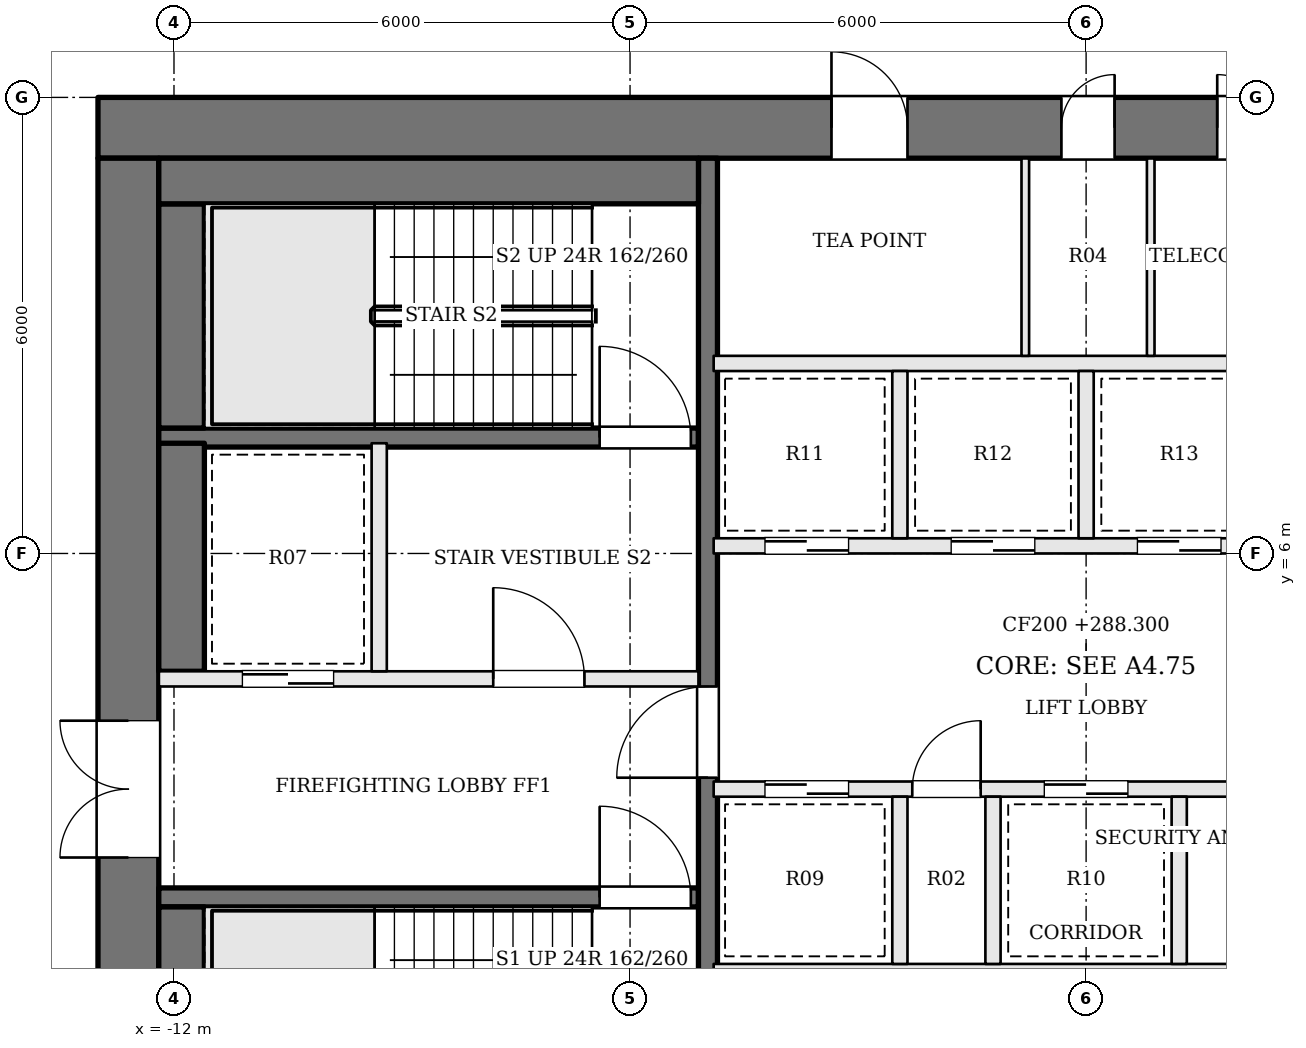
"""IFC4 building model, lengths in metres.
Left out: names, types, materials, properties, quantities, classifications, styles, units other than length and angle.
Written with IfcOpenShell. Run it as: python <this file> out.ifc"""

import sys

from ifc_helpers import new_model, si_unit, direction, frame, frame_2d, origin, place, context, subcontext, project, spatial, rectangle, extrude, element, fill, save


model = new_model("IFC4")
c1 = context("Model", 3, precision=1e-05, world=origin(), true_north=direction((0.0, 1.0)))
c2 = subcontext(c1, "Body", "Model", "MODEL_VIEW")
j1 = project(units=[si_unit("LENGTHUNIT", "METRE"), si_unit("PLANEANGLEUNIT", "RADIAN")], contexts=[c1])
p1 = place(None, origin())
s1 = spatial("IfcSite", under=j1, at=p1, CompositionType="ELEMENT")
p2 = place(p1, origin())
s2 = spatial("IfcBuilding", under=s1, at=p2, CompositionType="ELEMENT")
p3 = place(p2, frame((0.0, 0.0, 288.3)))
s3 = spatial("IfcBuildingStorey", under=s2, at=p3, CompositionType="ELEMENT", Elevation=288.3)
p4 = place(p3, frame((-13.0, 11.6, 0.0), z_axis=(0.0, 0.0, 1.0), x_axis=(1.0, 0.0, 0.0)))
e1 = element("IfcWall", 1, at=p4, inside=s3, PredefinedType="SHEAR", context=c2, shape_type="SweptSolid", body=[
    extrude(rectangle(XDim=26.0, YDim=0.8, at=frame_2d((13.0, 0.0))), origin(), (0.0, 0.0, 1.0), 3.9),
])
p5 = place(p4, frame((9.65, 0.0, 0.0)))
e2 = element("IfcOpeningElement", 2, at=p5, cuts=e1, PredefinedType="OPENING", context=c2, shape_type="SweptSolid", body=[
    extrude(rectangle(XDim=1.0, YDim=2.1, at=frame_2d((0.5, 1.05))), frame((0.0, 0.41, 0.0), z_axis=(0.0, -1.0, 0.0), x_axis=(1.0, 0.0, 0.0)), (0.0, 0.0, 1.0), 0.82),
])
p6 = place(p4, frame((12.675, 0.0, 0.0)))
e3 = element("IfcOpeningElement", 3, at=p6, cuts=e1, PredefinedType="OPENING", context=c2, shape_type="SweptSolid", body=[
    extrude(rectangle(XDim=0.7, YDim=2.1, at=frame_2d((0.35, 1.05))), frame((0.0, 0.41, 0.0), z_axis=(0.0, -1.0, 0.0), x_axis=(1.0, 0.0, 0.0)), (0.0, 0.0, 1.0), 0.82),
])
p7 = place(p4, frame((14.725, 0.0, 0.0)))
e4 = element("IfcOpeningElement", 4, at=p7, cuts=e1, PredefinedType="OPENING", context=c2, shape_type="SweptSolid", body=[
    extrude(rectangle(XDim=0.7, YDim=2.1, at=frame_2d((0.35, 1.05))), frame((0.0, 0.41, 0.0), z_axis=(0.0, -1.0, 0.0), x_axis=(1.0, 0.0, 0.0)), (0.0, 0.0, 1.0), 0.82),
])
p8 = place(p4, frame((16.6, 0.0, 0.0)))
e5 = element("IfcOpeningElement", 5, at=p8, cuts=e1, PredefinedType="OPENING", context=c2, shape_type="SweptSolid", body=[
    extrude(rectangle(XDim=1.0, YDim=2.1, at=frame_2d((0.5, 1.05))), frame((0.0, 0.41, 0.0), z_axis=(0.0, -1.0, 0.0), x_axis=(1.0, 0.0, 0.0)), (0.0, 0.0, 1.0), 0.82),
])
p9 = place(p3, frame((-12.6, -2.2, 0.0), z_axis=(0.0, 0.0, 1.0), x_axis=(0.0, 1.0, 0.0)))
e6 = element("IfcWall", 6, at=p9, inside=s3, PredefinedType="SHEAR", context=c2, shape_type="SweptSolid", body=[
    extrude(rectangle(XDim=13.4, YDim=0.8, at=frame_2d((6.7, 0.0))), origin(), (0.0, 0.0, 1.0), 3.9),
])
p10 = place(p9, frame((4.2, 0.0, 0.0)))
e7 = element("IfcOpeningElement", 7, at=p10, cuts=e6, PredefinedType="OPENING", context=c2, shape_type="SweptSolid", body=[
    extrude(rectangle(XDim=1.8, YDim=2.1, at=frame_2d((0.9, 1.05))), frame((0.0, 0.41, 0.0), z_axis=(0.0, -1.0, 0.0), x_axis=(1.0, 0.0, 0.0)), (0.0, 0.0, 1.0), 0.82),
])
p11 = place(p3, frame((-12.2, 1.475, 0.0), z_axis=(0.0, 0.0, 1.0), x_axis=(1.0, 0.0, 0.0)))
e8 = element("IfcWall", 8, at=p11, inside=s3, PredefinedType="SOLIDWALL", context=c2, shape_type="SweptSolid", body=[
    extrude(rectangle(XDim=7.1, YDim=0.25, at=frame_2d((3.55, 0.0))), origin(), (0.0, 0.0, 1.0), 3.7),
])
p12 = place(p11, frame((5.8, 0.0, 0.0)))
e9 = element("IfcOpeningElement", 9, at=p12, cuts=e8, PredefinedType="OPENING", context=c2, shape_type="SweptSolid", body=[
    extrude(rectangle(XDim=1.2, YDim=2.1, at=frame_2d((0.6, 1.05))), frame((0.0, 0.135, 0.0), z_axis=(0.0, -1.0, 0.0), x_axis=(1.0, 0.0, 0.0)), (0.0, 0.0, 1.0), 0.27),
])
p13 = place(p3, frame((-12.2, 4.35, 0.0), z_axis=(0.0, 0.0, 1.0), x_axis=(1.0, 0.0, 0.0)))
e10 = element("IfcWall", 10, at=p13, inside=s3, PredefinedType="SOLIDWALL", context=c2, shape_type="SweptSolid", body=[
    extrude(rectangle(XDim=7.1, YDim=0.2, at=frame_2d((3.55, 0.0))), origin(), (0.0, 0.0, 1.0), 3.7),
])
p14 = place(p13, frame((4.4, 0.0, 0.0)))
e11 = element("IfcOpeningElement", 11, at=p14, cuts=e10, PredefinedType="OPENING", context=c2, shape_type="SweptSolid", body=[
    extrude(rectangle(XDim=1.2, YDim=2.1, at=frame_2d((0.6, 1.05))), frame((0.0, 0.11, 0.0), z_axis=(0.0, -1.0, 0.0), x_axis=(1.0, 0.0, 0.0)), (0.0, 0.0, 1.0), 0.22),
])
p15 = place(p13, frame((1.1, 0.0, 0.0)))
e12 = element("IfcOpeningElement", 12, at=p15, cuts=e10, PredefinedType="OPENING", context=c2, shape_type="SweptSolid", body=[
    extrude(rectangle(XDim=1.2, YDim=2.1, at=frame_2d((0.6, 1.05))), frame((0.0, 0.11, 0.0), z_axis=(0.0, -1.0, 0.0), x_axis=(1.0, 0.0, 0.0)), (0.0, 0.0, 1.0), 0.22),
])
p16 = place(p3, frame((-12.2, 7.525, 0.0), z_axis=(0.0, 0.0, 1.0), x_axis=(1.0, 0.0, 0.0)))
e13 = element("IfcWall", 13, at=p16, inside=s3, PredefinedType="SOLIDWALL", context=c2, shape_type="SweptSolid", body=[
    extrude(rectangle(XDim=7.1, YDim=0.25, at=frame_2d((3.55, 0.0))), origin(), (0.0, 0.0, 1.0), 3.7),
])
p17 = place(p16, frame((5.8, 0.0, 0.0)))
e14 = element("IfcOpeningElement", 14, at=p17, cuts=e13, PredefinedType="OPENING", context=c2, shape_type="SweptSolid", body=[
    extrude(rectangle(XDim=1.2, YDim=2.1, at=frame_2d((0.6, 1.05))), frame((0.0, 0.135, 0.0), z_axis=(0.0, -1.0, 0.0), x_axis=(1.0, 0.0, 0.0)), (0.0, 0.0, 1.0), 0.27),
])
p18 = place(p3, frame((-9.3, 4.45, 0.0), z_axis=(0.0, 0.0, 1.0), x_axis=(0.0, 1.0, 0.0)))
e15 = element("IfcWall", 15, at=p18, inside=s3, PredefinedType="SOLIDWALL", context=c2, shape_type="SweptSolid", body=[
    extrude(rectangle(XDim=3.0, YDim=0.2, at=frame_2d((1.5, 0.0))), origin(), (0.0, 0.0, 1.0), 3.7),
])
p19 = place(p3, frame((-4.975, -2.2, 0.0), z_axis=(0.0, 0.0, 1.0), x_axis=(0.0, 1.0, 0.0)))
e16 = element("IfcWall", 16, at=p19, inside=s3, PredefinedType="SOLIDWALL", context=c2, shape_type="SweptSolid", body=[
    extrude(rectangle(XDim=13.4, YDim=0.25, at=frame_2d((6.7, 0.0))), origin(), (0.0, 0.0, 1.0), 3.7),
])
p20 = place(p19, frame((5.25, 0.0, 0.0)))
e17 = element("IfcOpeningElement", 17, at=p20, cuts=e16, PredefinedType="OPENING", context=c2, shape_type="SweptSolid", body=[
    extrude(rectangle(XDim=1.2, YDim=2.1, at=frame_2d((0.6, 1.05))), frame((0.0, 0.135, 0.0), z_axis=(0.0, -1.0, 0.0), x_axis=(1.0, 0.0, 0.0)), (0.0, 0.0, 1.0), 0.27),
])
p21 = place(p3, frame((-11.9, -1.6, 0.0), z_axis=(0.0, 0.0, 1.0), x_axis=(0.0, 1.0, 0.0)))
e18 = element("IfcWall", 18, at=p21, inside=s3, PredefinedType="SOLIDWALL", context=c2, shape_type="SweptSolid", body=[
    extrude(rectangle(XDim=2.95, YDim=0.6, at=frame_2d((1.475, 0.0))), origin(), (0.0, 0.0, 1.0), 3.7),
])
p22 = place(p3, frame((-11.9, 4.45, 0.0), z_axis=(0.0, 0.0, 1.0), x_axis=(0.0, 1.0, 0.0)))
e19 = element("IfcWall", 19, at=p22, inside=s3, PredefinedType="SOLIDWALL", context=c2, shape_type="SweptSolid", body=[
    extrude(rectangle(XDim=3.0, YDim=0.6, at=frame_2d((1.5, 0.0))), origin(), (0.0, 0.0, 1.0), 3.7),
])
p23 = place(p3, frame((-11.9, 7.65, 0.0), z_axis=(0.0, 0.0, 1.0), x_axis=(0.0, 1.0, 0.0)))
e20 = element("IfcWall", 20, at=p23, inside=s3, PredefinedType="SOLIDWALL", context=c2, shape_type="SweptSolid", body=[
    extrude(rectangle(XDim=2.95, YDim=0.6, at=frame_2d((1.475, 0.0))), origin(), (0.0, 0.0, 1.0), 3.7),
])
p24 = place(p3, frame((-12.2, 10.9, 0.0), z_axis=(0.0, 0.0, 1.0), x_axis=(1.0, 0.0, 0.0)))
e21 = element("IfcWall", 21, at=p24, inside=s3, PredefinedType="SOLIDWALL", context=c2, shape_type="SweptSolid", body=[
    extrude(rectangle(XDim=7.1, YDim=0.6, at=frame_2d((3.55, 0.0))), origin(), (0.0, 0.0, 1.0), 3.7),
])
p25 = place(p3, frame((-4.9, 0.5, 0.0), z_axis=(0.0, 0.0, 1.0), x_axis=(1.0, 0.0, 0.0)))
e22 = element("IfcWall", 22, at=p25, inside=s3, PredefinedType="SOLIDWALL", context=c2, shape_type="SweptSolid", body=[
    extrude(rectangle(XDim=9.8, YDim=0.2, at=frame_2d((4.9, 0.0))), origin(), (0.0, 0.0, 1.0), 3.7),
])
p26 = place(p3, frame((-4.9, 2.9, 0.0), z_axis=(0.0, 0.0, 1.0), x_axis=(1.0, 0.0, 0.0)))
e23 = element("IfcWall", 23, at=p26, inside=s3, PredefinedType="SOLIDWALL", context=c2, shape_type="SweptSolid", body=[
    extrude(rectangle(XDim=9.8, YDim=0.2, at=frame_2d((4.9, 0.0))), origin(), (0.0, 0.0, 1.0), 3.7),
])
p27 = place(p26, frame((0.675, 0.0, 0.0)))
e24 = element("IfcOpeningElement", 24, at=p27, cuts=e23, PredefinedType="OPENING", context=c2, shape_type="SweptSolid", body=[
    extrude(rectangle(XDim=1.1, YDim=2.1, at=frame_2d((0.55, 1.05))), frame((0.0, 0.11, 0.0), z_axis=(0.0, -1.0, 0.0), x_axis=(1.0, 0.0, 0.0)), (0.0, 0.0, 1.0), 0.22),
])
p28 = place(p26, frame((2.613, 0.0, 0.0)))
e25 = element("IfcOpeningElement", 25, at=p28, cuts=e23, PredefinedType="OPENING", context=c2, shape_type="SweptSolid", body=[
    extrude(rectangle(XDim=0.9, YDim=2.1, at=frame_2d((0.45, 1.05))), frame((0.0, 0.11, 0.0), z_axis=(0.0, -1.0, 0.0), x_axis=(1.0, 0.0, 0.0)), (0.0, 0.0, 1.0), 0.22),
])
p29 = place(p26, frame((4.35, 0.0, 0.0)))
e26 = element("IfcOpeningElement", 26, at=p29, cuts=e23, PredefinedType="OPENING", context=c2, shape_type="SweptSolid", body=[
    extrude(rectangle(XDim=1.1, YDim=2.1, at=frame_2d((0.55, 1.05))), frame((0.0, 0.11, 0.0), z_axis=(0.0, -1.0, 0.0), x_axis=(1.0, 0.0, 0.0)), (0.0, 0.0, 1.0), 0.22),
])
p30 = place(p26, frame((7.463, 0.0, 0.0)))
e27 = element("IfcOpeningElement", 27, at=p30, cuts=e23, PredefinedType="OPENING", context=c2, shape_type="SweptSolid", body=[
    extrude(rectangle(XDim=1.0, YDim=2.1, at=frame_2d((0.5, 1.05))), frame((0.0, 0.11, 0.0), z_axis=(0.0, -1.0, 0.0), x_axis=(1.0, 0.0, 0.0)), (0.0, 0.0, 1.0), 0.22),
])
p31 = place(p3, frame((-4.9, 6.1, 0.0), z_axis=(0.0, 0.0, 1.0), x_axis=(1.0, 0.0, 0.0)))
e28 = element("IfcWall", 28, at=p31, inside=s3, PredefinedType="SOLIDWALL", context=c2, shape_type="SweptSolid", body=[
    extrude(rectangle(XDim=9.8, YDim=0.2, at=frame_2d((4.9, 0.0))), origin(), (0.0, 0.0, 1.0), 3.7),
])
p32 = place(p31, frame((0.675, 0.0, 0.0)))
e29 = element("IfcOpeningElement", 29, at=p32, cuts=e28, PredefinedType="OPENING", context=c2, shape_type="SweptSolid", body=[
    extrude(rectangle(XDim=1.1, YDim=2.1, at=frame_2d((0.55, 1.05))), frame((0.0, 0.11, 0.0), z_axis=(0.0, -1.0, 0.0), x_axis=(1.0, 0.0, 0.0)), (0.0, 0.0, 1.0), 0.22),
])
p33 = place(p31, frame((3.125, 0.0, 0.0)))
e30 = element("IfcOpeningElement", 30, at=p33, cuts=e28, PredefinedType="OPENING", context=c2, shape_type="SweptSolid", body=[
    extrude(rectangle(XDim=1.1, YDim=2.1, at=frame_2d((0.55, 1.05))), frame((0.0, 0.11, 0.0), z_axis=(0.0, -1.0, 0.0), x_axis=(1.0, 0.0, 0.0)), (0.0, 0.0, 1.0), 0.22),
])
p34 = place(p31, frame((5.575, 0.0, 0.0)))
e31 = element("IfcOpeningElement", 31, at=p34, cuts=e28, PredefinedType="OPENING", context=c2, shape_type="SweptSolid", body=[
    extrude(rectangle(XDim=1.1, YDim=2.1, at=frame_2d((0.55, 1.05))), frame((0.0, 0.11, 0.0), z_axis=(0.0, -1.0, 0.0), x_axis=(1.0, 0.0, 0.0)), (0.0, 0.0, 1.0), 0.22),
])
p35 = place(p31, frame((8.025, 0.0, 0.0)))
e32 = element("IfcOpeningElement", 32, at=p35, cuts=e28, PredefinedType="OPENING", context=c2, shape_type="SweptSolid", body=[
    extrude(rectangle(XDim=1.1, YDim=2.1, at=frame_2d((0.55, 1.05))), frame((0.0, 0.11, 0.0), z_axis=(0.0, -1.0, 0.0), x_axis=(1.0, 0.0, 0.0)), (0.0, 0.0, 1.0), 0.22),
])
p36 = place(p3, frame((-4.9, 8.5, 0.0), z_axis=(0.0, 0.0, 1.0), x_axis=(1.0, 0.0, 0.0)))
e33 = element("IfcWall", 33, at=p36, inside=s3, PredefinedType="SOLIDWALL", context=c2, shape_type="SweptSolid", body=[
    extrude(rectangle(XDim=9.8, YDim=0.2, at=frame_2d((4.9, 0.0))), origin(), (0.0, 0.0, 1.0), 3.7),
])
for number, where, z_axis, x_axis in (
    (34, (-2.45, 0.6, 0.0), (0.0, 0.0, 1.0), (0.0, 1.0, 0.0)),
    (35, (-1.225, 0.6, 0.0), (0.0, 0.0, 1.0), (0.0, 1.0, 0.0)),
    (36, (1.225, 0.6, 0.0), (0.0, 0.0, 1.0), (0.0, 1.0, 0.0)),
    (37, (-2.45, 6.2, 0.0), (0.0, 0.0, 1.0), (0.0, 1.0, 0.0)),
    (38, (0.0, 6.2, 0.0), (0.0, 0.0, 1.0), (0.0, 1.0, 0.0)),
):
    element("IfcWall", number, at=place(p3, frame(where, z_axis=z_axis, x_axis=x_axis)), inside=s3, PredefinedType="SOLIDWALL", context=c2, shape_type="SweptSolid", body=[
        extrude(rectangle(XDim=2.2, YDim=0.2, at=frame_2d((1.1, 0.0))), origin(), (0.0, 0.0, 1.0), 3.7),
    ])
for number, where, z_axis, x_axis in (
    (39, (-0.8, 8.6, 0.0), (0.0, 0.0, 1.0), (0.0, 1.0, 0.0)),
    (40, (0.85, 8.6, 0.0), (0.0, 0.0, 1.0), (0.0, 1.0, 0.0)),
):
    element("IfcWall", number, at=place(p3, frame(where, z_axis=z_axis, x_axis=x_axis)), inside=s3, PredefinedType="PARTITIONING", context=c2, shape_type="SweptSolid", body=[
        extrude(rectangle(XDim=2.6, YDim=0.1, at=frame_2d((1.3, 0.0))), origin(), (0.0, 0.0, 1.0), 3.7),
    ])
p37 = place(p10, origin())
e41 = element("IfcDoor", 41, at=p37, inside=s3, OperationType="DOUBLE_DOOR_SINGLE_SWING", PredefinedType="DOOR", context=c2, shape_type="SweptSolid", body=[
    extrude(rectangle(XDim=1.8, YDim=2.1, at=frame_2d((0.9, 1.05))), frame((0.0, 0.025, 0.0), z_axis=(0.0, -1.0, 0.0), x_axis=(1.0, 0.0, 0.0)), (0.0, 0.0, 1.0), 0.05),
])
fill(e7, e41)
p38 = place(p20, origin())
e42 = element("IfcDoor", 42, at=p38, inside=s3, OperationType="SINGLE_SWING_LEFT", PredefinedType="DOOR", context=c2, shape_type="SweptSolid", body=[
    extrude(rectangle(XDim=1.2, YDim=2.1, at=frame_2d((0.6, 1.05))), frame((0.0, 0.025, 0.0), z_axis=(0.0, -1.0, 0.0), x_axis=(1.0, 0.0, 0.0)), (0.0, 0.0, 1.0), 0.05),
])
fill(e17, e42)
p39 = place(p14, origin())
e43 = element("IfcDoor", 43, at=p39, inside=s3, OperationType="SINGLE_SWING_LEFT", PredefinedType="DOOR", context=c2, shape_type="SweptSolid", body=[
    extrude(rectangle(XDim=1.2, YDim=2.1, at=frame_2d((0.6, 1.05))), frame((0.0, 0.025, 0.0), z_axis=(0.0, -1.0, 0.0), x_axis=(1.0, 0.0, 0.0)), (0.0, 0.0, 1.0), 0.05),
])
fill(e11, e43)
p40 = place(p12, origin())
e44 = element("IfcDoor", 44, at=p40, inside=s3, OperationType="SINGLE_SWING_LEFT", PredefinedType="DOOR", context=c2, shape_type="SweptSolid", body=[
    extrude(rectangle(XDim=1.2, YDim=2.1, at=frame_2d((0.6, 1.05))), frame((0.0, 0.025, 0.0), z_axis=(0.0, -1.0, 0.0), x_axis=(1.0, 0.0, 0.0)), (0.0, 0.0, 1.0), 0.05),
])
fill(e9, e44)
p41 = place(p17, origin())
e45 = element("IfcDoor", 45, at=p41, inside=s3, OperationType="SINGLE_SWING_LEFT", PredefinedType="DOOR", context=c2, shape_type="SweptSolid", body=[
    extrude(rectangle(XDim=1.2, YDim=2.1, at=frame_2d((0.6, 1.05))), frame((0.0, 0.025, 0.0), z_axis=(0.0, -1.0, 0.0), x_axis=(1.0, 0.0, 0.0)), (0.0, 0.0, 1.0), 0.05),
])
fill(e14, e45)
p42 = place(p15, origin())
e46 = element("IfcDoor", 46, at=p42, inside=s3, OperationType="SLIDING_TO_RIGHT", PredefinedType="DOOR", context=c2, shape_type="SweptSolid", body=[
    extrude(rectangle(XDim=1.2, YDim=2.1, at=frame_2d((0.6, 1.05))), frame((0.0, 0.025, 0.0), z_axis=(0.0, -1.0, 0.0), x_axis=(1.0, 0.0, 0.0)), (0.0, 0.0, 1.0), 0.05),
])
fill(e12, e46)
p43 = place(p27, origin())
e47 = element("IfcDoor", 47, at=p43, inside=s3, OperationType="SLIDING_TO_RIGHT", PredefinedType="DOOR", context=c2, shape_type="SweptSolid", body=[
    extrude(rectangle(XDim=1.1, YDim=2.1, at=frame_2d((0.55, 1.05))), frame((0.0, 0.025, 0.0), z_axis=(0.0, -1.0, 0.0), x_axis=(1.0, 0.0, 0.0)), (0.0, 0.0, 1.0), 0.05),
])
fill(e24, e47)
p44 = place(p28, origin())
e48 = element("IfcDoor", 48, at=p44, inside=s3, OperationType="SINGLE_SWING_RIGHT", PredefinedType="DOOR", context=c2, shape_type="SweptSolid", body=[
    extrude(rectangle(XDim=0.9, YDim=2.1, at=frame_2d((0.45, 1.05))), frame((0.0, 0.025, 0.0), z_axis=(0.0, -1.0, 0.0), x_axis=(1.0, 0.0, 0.0)), (0.0, 0.0, 1.0), 0.05),
])
fill(e25, e48)
p45 = place(p29, origin())
e49 = element("IfcDoor", 49, at=p45, inside=s3, OperationType="SLIDING_TO_LEFT", PredefinedType="DOOR", context=c2, shape_type="SweptSolid", body=[
    extrude(rectangle(XDim=1.1, YDim=2.1, at=frame_2d((0.55, 1.05))), frame((0.0, 0.025, 0.0), z_axis=(0.0, -1.0, 0.0), x_axis=(1.0, 0.0, 0.0)), (0.0, 0.0, 1.0), 0.05),
])
fill(e26, e49)
p46 = place(p32, origin())
e50 = element("IfcDoor", 50, at=p46, inside=s3, OperationType="SLIDING_TO_RIGHT", PredefinedType="DOOR", context=c2, shape_type="SweptSolid", body=[
    extrude(rectangle(XDim=1.1, YDim=2.1, at=frame_2d((0.55, 1.05))), frame((0.0, 0.025, 0.0), z_axis=(0.0, -1.0, 0.0), x_axis=(1.0, 0.0, 0.0)), (0.0, 0.0, 1.0), 0.05),
])
fill(e29, e50)
p47 = place(p33, origin())
e51 = element("IfcDoor", 51, at=p47, inside=s3, OperationType="SLIDING_TO_LEFT", PredefinedType="DOOR", context=c2, shape_type="SweptSolid", body=[
    extrude(rectangle(XDim=1.1, YDim=2.1, at=frame_2d((0.55, 1.05))), frame((0.0, 0.025, 0.0), z_axis=(0.0, -1.0, 0.0), x_axis=(1.0, 0.0, 0.0)), (0.0, 0.0, 1.0), 0.05),
])
fill(e30, e51)
p48 = place(p34, origin())
e52 = element("IfcDoor", 52, at=p48, inside=s3, OperationType="SLIDING_TO_RIGHT", PredefinedType="DOOR", context=c2, shape_type="SweptSolid", body=[
    extrude(rectangle(XDim=1.1, YDim=2.1, at=frame_2d((0.55, 1.05))), frame((0.0, 0.025, 0.0), z_axis=(0.0, -1.0, 0.0), x_axis=(1.0, 0.0, 0.0)), (0.0, 0.0, 1.0), 0.05),
])
fill(e31, e52)
p49 = place(p5, origin())
e53 = element("IfcDoor", 53, at=p49, inside=s3, OperationType="SINGLE_SWING_LEFT", PredefinedType="DOOR", context=c2, shape_type="SweptSolid", body=[
    extrude(rectangle(XDim=1.0, YDim=2.1, at=frame_2d((0.5, 1.05))), frame((0.0, 0.025, 0.0), z_axis=(0.0, -1.0, 0.0), x_axis=(1.0, 0.0, 0.0)), (0.0, 0.0, 1.0), 0.05),
])
fill(e2, e53)
p50 = place(p6, origin())
e54 = element("IfcDoor", 54, at=p50, inside=s3, OperationType="SINGLE_SWING_RIGHT", PredefinedType="DOOR", context=c2, shape_type="SweptSolid", body=[
    extrude(rectangle(XDim=0.7, YDim=2.1, at=frame_2d((0.35, 1.05))), frame((0.0, 0.025, 0.0), z_axis=(0.0, -1.0, 0.0), x_axis=(1.0, 0.0, 0.0)), (0.0, 0.0, 1.0), 0.05),
])
fill(e3, e54)
p51 = place(p7, origin())
e55 = element("IfcDoor", 55, at=p51, inside=s3, OperationType="SINGLE_SWING_LEFT", PredefinedType="DOOR", context=c2, shape_type="SweptSolid", body=[
    extrude(rectangle(XDim=0.7, YDim=2.1, at=frame_2d((0.35, 1.05))), frame((0.0, 0.025, 0.0), z_axis=(0.0, -1.0, 0.0), x_axis=(1.0, 0.0, 0.0)), (0.0, 0.0, 1.0), 0.05),
])
fill(e4, e55)
save(model, sys.argv[1])
